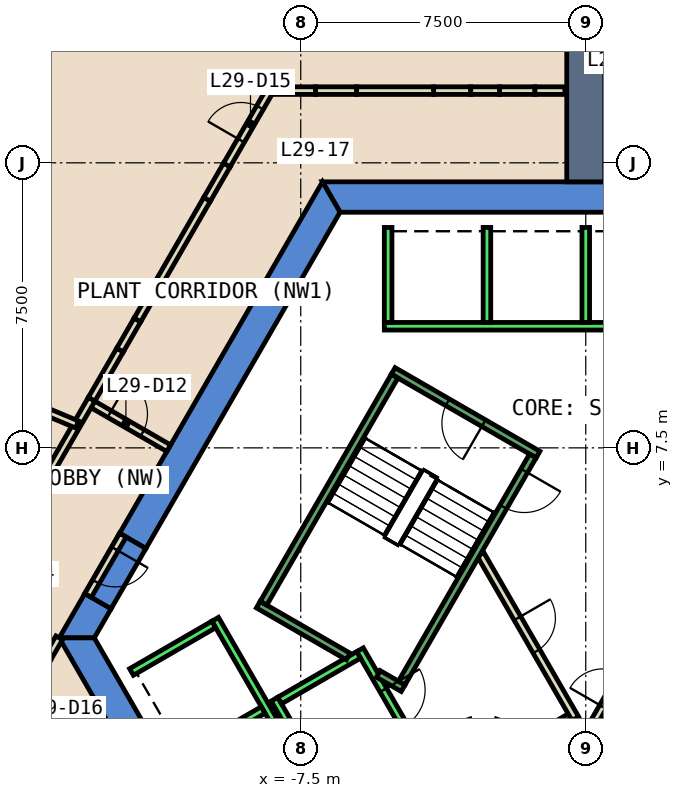
"""IFC4 building model, lengths in metres.
Left out: names, types, materials, properties, quantities, classifications, styles, units other than length and angle.
Written with IfcOpenShell. Run it as: python <this file> out.ifc"""

import sys

from ifc_helpers import new_model, si_unit, direction, frame, frame_2d, origin, place, context, subcontext, project, spatial, polyline, rectangle, outline, extrude, element, fill, save


model = new_model("IFC4")
c1 = context("Model", 3, precision=1e-05, world=origin(), true_north=direction((0.0, 1.0)))
c2 = subcontext(c1, "Body", "Model", "MODEL_VIEW")
j1 = project(units=[si_unit("LENGTHUNIT", "METRE"), si_unit("PLANEANGLEUNIT", "RADIAN")], contexts=[c1])
p1 = place(None, origin())
s1 = spatial("IfcSite", under=j1, at=p1, CompositionType="ELEMENT")
p2 = place(p1, origin())
s2 = spatial("IfcBuilding", under=s1, at=p2, CompositionType="ELEMENT")
p3 = place(p2, frame((0.0, 0.0, 132.8)))
s3 = spatial("IfcBuildingStorey", under=s2, at=p3, CompositionType="ELEMENT", Elevation=132.8)
p4 = place(p3, frame((0.0, 0.0, -0.6)))
e1 = element("IfcWall", 1, at=p4, inside=s3, PredefinedType="SHEAR", context=c2, shape_type="SweptSolid", body=[
    extrude(outline(polyline([(6.928, 14.5), (-6.928, 14.5), (-6.466, 13.7), (6.466, 13.7), (6.928, 14.5)])), origin(), (0.0, 0.0, 1.0), 5.4),
])
p5 = place(p3, frame((0.0, 0.0, -0.6)))
e2 = element("IfcWall", 2, at=p5, inside=s3, PredefinedType="SHEAR", context=c2, shape_type="SweptSolid", body=[
    extrude(outline(polyline([(-12.267, 5.252), (-11.575, 4.852), (-6.466, 13.7), (-6.928, 14.5), (-12.267, 5.252)])), origin(), (0.0, 0.0, 1.0), 5.4),
])
p6 = place(p3, frame((0.0, 0.0, -0.6)))
e3 = element("IfcWall", 3, at=p6, inside=s3, PredefinedType="SHEAR", context=c2, shape_type="SweptSolid", body=[
    extrude(outline(polyline([(-12.49, 3.268), (-13.182, 3.667), (-13.856, 2.5), (-12.933, 2.5), (-12.49, 3.268)])), origin(), (0.0, 0.0, 1.0), 5.4),
])
p7 = place(p3, frame((0.0, 0.0, 3.6)))
e4 = element("IfcWall", 4, at=p7, inside=s3, PredefinedType="SHEAR", context=c2, shape_type="SweptSolid", body=[
    extrude(outline(polyline([(-13.182, 3.667), (-12.49, 3.268), (-11.575, 4.852), (-12.267, 5.252), (-13.182, 3.667)])), origin(), (0.0, 0.0, 1.0), 1.2),
])
p8 = place(p3, frame((0.0, 0.0, -0.6)))
e5 = element("IfcWall", 5, at=p8, inside=s3, PredefinedType="SHEAR", context=c2, shape_type="SweptSolid", body=[
    extrude(outline(polyline([(-13.856, 2.5), (-6.928, -9.5), (-6.466, -8.7), (-12.933, 2.5), (-13.856, 2.5)])), origin(), (0.0, 0.0, 1.0), 5.4),
])
p9 = place(p3, frame((0.0, 14.5, 0.0), z_axis=(0.0, 0.0, 1.0), x_axis=(0.0, 1.0, 0.0)))
e6 = element("IfcWall", 6, at=p9, inside=s3, PredefinedType="SHEAR", context=c2, shape_type="SweptSolid", body=[
    extrude(rectangle(XDim=27.714, YDim=1.0, at=frame_2d((13.857, 0.0))), origin(), (0.0, 0.0, 1.0), 4.8),
])
p10 = place(p3, frame((-0.52, -1.0, 0.0), z_axis=(0.0, 0.0, 1.0), x_axis=(0.50011622646, 0.865958290007, 0.0)))
e7 = element("IfcWall", 7, at=p10, inside=s3, PredefinedType="PARTITIONING", context=c2, shape_type="SweptSolid", body=[
    extrude(rectangle(XDim=4.991, YDim=0.2, at=frame_2d((2.496, 0.0))), origin(), (0.0, 0.0, 1.0), 4.8),
])
p11 = place(p10, frame((1.945, 0.0, 0.0)))
e8 = element("IfcOpeningElement", 8, at=p11, cuts=e7, PredefinedType="OPENING", context=c2, shape_type="SweptSolid", body=[
    extrude(rectangle(XDim=1.0, YDim=2.1, at=frame_2d((0.5, 1.05))), frame((0.0, 0.11, 0.0), z_axis=(0.0, -1.0, 0.0), x_axis=(1.0, 0.0, 0.0)), (0.0, 0.0, 1.0), 0.22),
])
p12 = place(p3, frame((-0.412, 0.414, 0.0), z_axis=(0.0, 0.0, 1.0), x_axis=(-0.866017369001, -0.500013916395, 0.0)))
e9 = element("IfcWall", 9, at=p12, inside=s3, PredefinedType="PARTITIONING", context=c2, shape_type="SweptSolid", body=[
    extrude(rectangle(XDim=1.45, YDim=0.2, at=frame_2d((0.725, 0.0))), origin(), (0.0, 0.0, 1.0), 4.8),
])
p13 = place(p3, frame((-2.07, 0.16, 0.0), z_axis=(0.0, 0.0, 1.0), x_axis=(-0.942199461132, 0.335052496547, 0.0)))
e10 = element("IfcWall", 10, at=p13, inside=s3, PredefinedType="PARTITIONING", context=c2, shape_type="SweptSolid", body=[
    extrude(rectangle(XDim=0.337, YDim=0.2, at=frame_2d((0.169, 0.0))), origin(), (0.0, 0.0, 1.0), 4.8),
])
p14 = place(p3, frame((-3.012, 0.273, 0.0), z_axis=(0.0, 0.0, 1.0), x_axis=(-0.942280615813, -0.334824194261, 0.0)))
e11 = element("IfcWall", 11, at=p14, inside=s3, PredefinedType="PARTITIONING", context=c2, shape_type="SweptSolid", body=[
    extrude(rectangle(XDim=0.338, YDim=0.2, at=frame_2d((0.169, 0.0))), origin(), (0.0, 0.0, 1.0), 4.8),
])
p15 = place(p3, frame((-2.771, 4.7, 0.0), z_axis=(0.0, 0.0, 1.0), x_axis=(0.499969479948, -0.866043023828, 0.0)))
e12 = element("IfcWall", 12, at=p15, inside=s3, PredefinedType="PARTITIONING", context=c2, shape_type="SweptSolid", body=[
    extrude(rectangle(XDim=4.99, YDim=0.2, at=frame_2d((2.495, 0.0))), origin(), (0.0, 0.0, 1.0), 4.8),
])
p16 = place(p15, frame((1.945, 0.0, 0.0)))
e13 = element("IfcOpeningElement", 13, at=p16, cuts=e12, PredefinedType="OPENING", context=c2, shape_type="SweptSolid", body=[
    extrude(rectangle(XDim=1.0, YDim=2.1, at=frame_2d((0.5, 1.05))), frame((0.0, 0.11, 0.0), z_axis=(0.0, -1.0, 0.0), x_axis=(1.0, 0.0, 0.0)), (0.0, 0.0, 1.0), 0.22),
])
p17 = place(p3, frame((-13.053, 8.691, 0.0), z_axis=(0.0, 0.0, 1.0), x_axis=(0.865973769406, -0.500089422704, 0.0)))
e14 = element("IfcWall", 14, at=p17, inside=s3, PredefinedType="PARTITIONING", context=c2, shape_type="SweptSolid", body=[
    extrude(rectangle(XDim=2.399, YDim=0.2, at=frame_2d((1.2, 0.0))), origin(), (0.0, 0.0, 1.0), 4.8),
])
p18 = place(p17, frame((0.6, 0.0, 0.0)))
e15 = element("IfcOpeningElement", 15, at=p18, cuts=e14, PredefinedType="OPENING", context=c2, shape_type="SweptSolid", body=[
    extrude(rectangle(XDim=1.0, YDim=2.1, at=frame_2d((0.5, 1.05))), frame((0.0, 0.11, 0.0), z_axis=(0.0, -1.0, 0.0), x_axis=(1.0, 0.0, 0.0)), (0.0, 0.0, 1.0), 0.22),
])
p19 = place(p3, frame((-13.856, 2.501, 0.0), z_axis=(0.0, 0.0, 1.0), x_axis=(-0.500766044352, -0.865582675903, 0.0)))
e16 = element("IfcWall", 16, at=p19, inside=s3, PredefinedType="PARTITIONING", context=c2, shape_type="SweptSolid", body=[
    extrude(rectangle(XDim=0.641, YDim=0.2, at=frame_2d((0.321, 0.0))), origin(), (0.0, 0.0, 1.0), 2.4),
])
p20 = place(p3, frame((-13.003, 8.778, 0.0), z_axis=(0.0, 0.0, 1.0), x_axis=(0.499929606556, 0.866066041644, 0.0)))
e17 = element("IfcWall", 17, at=p20, inside=s3, PredefinedType="PARTITIONING", context=c2, shape_type="SweptSolid", body=[
    extrude(rectangle(XDim=1.496, YDim=0.2, at=frame_2d((0.748, 0.0))), origin(), (0.0, 0.0, 1.0), 4.8),
])
p21 = place(p3, frame((-8.214, 16.9, 0.0), z_axis=(0.0, 0.0, 1.0), x_axis=(1.0, 0.0, 0.0)))
e18 = element("IfcWall", 18, at=p21, inside=s3, PredefinedType="PARTITIONING", context=c2, shape_type="SweptSolid", body=[
    extrude(rectangle(XDim=1.105, YDim=0.2, at=frame_2d((0.553, 0.0))), origin(), (0.0, 0.0, 1.0), 4.8),
])
p22 = place(p3, frame((-14.001, -2.05, 0.0), z_axis=(0.0, 0.0, 1.0), x_axis=(-0.499842197933, 0.866116491683, 0.0)))
e19 = element("IfcWall", 19, at=p22, inside=s3, PredefinedType="PARTITIONING", context=c2, shape_type="SweptSolid", body=[
    extrude(rectangle(XDim=5.354, YDim=0.2, at=frame_2d((2.677, 0.0))), origin(), (0.0, 0.0, 1.0), 4.8),
])
p23 = place(p22, frame((1.301, 0.0, 0.0)))
e20 = element("IfcOpeningElement", 20, at=p23, cuts=e19, PredefinedType="OPENING", context=c2, shape_type="SweptSolid", body=[
    extrude(rectangle(XDim=1.0, YDim=2.1, at=frame_2d((0.5, 1.05))), frame((0.0, 0.11, 0.0), z_axis=(0.0, -1.0, 0.0), x_axis=(1.0, 0.0, 0.0)), (0.0, 0.0, 1.0), 0.22),
])
p24 = place(p3, frame((-12.181, 5.202, 0.0), z_axis=(0.0, 0.0, 1.0), x_axis=(-0.500215337403, -0.865901042976, 0.0)))
e21 = element("IfcWall", 21, at=p24, inside=s3, PredefinedType="PARTITIONING", context=c2, shape_type="SweptSolid", body=[
    extrude(rectangle(XDim=1.829, YDim=0.2, at=frame_2d((0.915, 0.0))), origin(), (0.0, 0.0, 1.0), 2.4),
])
p25 = place(p24, frame((0.415, 0.0, 0.0)))
e22 = element("IfcOpeningElement", 22, at=p25, cuts=e21, PredefinedType="OPENING", context=c2, shape_type="SweptSolid", body=[
    extrude(rectangle(XDim=1.0, YDim=2.1, at=frame_2d((0.5, 1.05))), frame((0.0, 0.11, 0.0), z_axis=(0.0, -1.0, 0.0), x_axis=(1.0, 0.0, 0.0)), (0.0, 0.0, 1.0), 0.22),
])
p26 = place(p3, frame((-14.582, 6.043, 0.0), z_axis=(0.0, 0.0, 1.0), x_axis=(0.499693771811, 0.866202132538, 0.0)))
e23 = element("IfcWall", 23, at=p26, inside=s3, PredefinedType="PARTITIONING", context=c2, shape_type="SweptSolid", body=[
    extrude(rectangle(XDim=0.982, YDim=0.2, at=frame_2d((0.491, 0.0))), origin(), (0.0, 0.0, 1.0), 2.4),
])
p27 = place(p3, frame((-14.091, 6.894, 0.0), z_axis=(0.0, 0.0, 1.0), x_axis=(0.500133637508, 0.865948234384, 0.0)))
e24 = element("IfcWall", 24, at=p27, inside=s3, PredefinedType="PARTITIONING", context=c2, shape_type="SweptSolid", body=[
    extrude(rectangle(XDim=2.176, YDim=0.2, at=frame_2d((1.088, 0.0))), origin(), (0.0, 0.0, 1.0), 4.8),
])
p28 = place(p3, frame((-12.255, 10.074, 0.0), z_axis=(0.0, 0.0, 1.0), x_axis=(0.499614570368, 0.866247817357, 0.0)))
e25 = element("IfcWall", 25, at=p28, inside=s3, PredefinedType="PARTITIONING", context=c2, shape_type="SweptSolid", body=[
    extrude(rectangle(XDim=0.914, YDim=0.2, at=frame_2d((0.457, 0.0))), origin(), (0.0, 0.0, 1.0), 2.4),
])
p29 = place(p3, frame((-11.798, 10.866, 0.0), z_axis=(0.0, 0.0, 1.0), x_axis=(0.49997801172, 0.866038098351, 0.0)))
e26 = element("IfcWall", 26, at=p29, inside=s3, PredefinedType="PARTITIONING", context=c2, shape_type="SweptSolid", body=[
    extrude(rectangle(XDim=3.666, YDim=0.2, at=frame_2d((1.833, 0.0))), origin(), (0.0, 0.0, 1.0), 4.8),
])
p30 = place(p3, frame((-9.965, 14.041, 0.0), z_axis=(0.0, 0.0, 1.0), x_axis=(0.500121408466, 0.865955297226, 0.0)))
e27 = element("IfcWall", 27, at=p30, inside=s3, PredefinedType="PARTITIONING", context=c2, shape_type="SweptSolid", body=[
    extrude(rectangle(XDim=1.042, YDim=0.2, at=frame_2d((0.521, 0.0))), origin(), (0.0, 0.0, 1.0), 2.4),
])
p31 = place(p3, frame((-9.444, 14.943, 0.0), z_axis=(0.0, 0.0, 1.0), x_axis=(0.500032858622, 0.866006432019, 0.0)))
e28 = element("IfcWall", 28, at=p31, inside=s3, PredefinedType="PARTITIONING", context=c2, shape_type="SweptSolid", body=[
    extrude(rectangle(XDim=2.36, YDim=0.2, at=frame_2d((1.18, 0.0))), origin(), (0.0, 0.0, 1.0), 4.8),
])
p32 = place(p31, frame((0.744, 0.0, 0.0)))
e29 = element("IfcOpeningElement", 29, at=p32, cuts=e28, PredefinedType="OPENING", context=c2, shape_type="SweptSolid", body=[
    extrude(rectangle(XDim=1.0, YDim=2.1, at=frame_2d((0.5, 1.05))), frame((0.0, 0.11, 0.0), z_axis=(0.0, -1.0, 0.0), x_axis=(1.0, 0.0, 0.0)), (0.0, 0.0, 1.0), 0.22),
])
p33 = place(p3, frame((-7.109, 16.9, 0.0), z_axis=(0.0, 0.0, 1.0), x_axis=(1.0, 0.0, 0.0)))
e30 = element("IfcWall", 30, at=p33, inside=s3, PredefinedType="PARTITIONING", context=c2, shape_type="SweptSolid", body=[
    extrude(rectangle(XDim=1.08, YDim=0.2, at=frame_2d((0.54, 0.0))), origin(), (0.0, 0.0, 1.0), 2.4),
])
p34 = place(p3, frame((-6.029, 16.9, 0.0), z_axis=(0.0, 0.0, 1.0), x_axis=(1.0, 0.0, 0.0)))
e31 = element("IfcWall", 31, at=p34, inside=s3, PredefinedType="PARTITIONING", context=c2, shape_type="SweptSolid", body=[
    extrude(rectangle(XDim=2.028, YDim=0.2, at=frame_2d((1.014, 0.0))), origin(), (0.0, 0.0, 1.0), 4.8),
])
p35 = place(p3, frame((-4.001, 16.9, 0.0), z_axis=(0.0, 0.0, 1.0), x_axis=(1.0, 0.0, 0.0)))
e32 = element("IfcWall", 32, at=p35, inside=s3, PredefinedType="PARTITIONING", context=c2, shape_type="SweptSolid", body=[
    extrude(rectangle(XDim=0.975, YDim=0.2, at=frame_2d((0.488, 0.0))), origin(), (0.0, 0.0, 1.0), 2.4),
])
p36 = place(p3, frame((-3.026, 16.9, 0.0), z_axis=(0.0, 0.0, 1.0), x_axis=(1.0, 0.0, 0.0)))
e33 = element("IfcWall", 33, at=p36, inside=s3, PredefinedType="PARTITIONING", context=c2, shape_type="SweptSolid", body=[
    extrude(rectangle(XDim=0.757, YDim=0.2, at=frame_2d((0.378, 0.0))), origin(), (0.0, 0.0, 1.0), 4.8),
])
p37 = place(p3, frame((-2.269, 16.9, 0.0), z_axis=(0.0, 0.0, 1.0), x_axis=(1.0, 0.0, 0.0)))
e34 = element("IfcWall", 34, at=p37, inside=s3, PredefinedType="PARTITIONING", context=c2, shape_type="SweptSolid", body=[
    extrude(rectangle(XDim=0.932, YDim=0.2, at=frame_2d((0.466, 0.0))), origin(), (0.0, 0.0, 1.0), 2.4),
])
p38 = place(p3, frame((-1.337, 16.9, 0.0), z_axis=(0.0, 0.0, 1.0), x_axis=(1.0, 0.0, 0.0)))
e35 = element("IfcWall", 35, at=p38, inside=s3, PredefinedType="PARTITIONING", context=c2, shape_type="SweptSolid", body=[
    extrude(rectangle(XDim=0.787, YDim=0.2, at=frame_2d((0.394, 0.0))), origin(), (0.0, 0.0, 1.0), 4.8),
])
p39 = place(p3, frame((-23.688, 12.437, 0.0), z_axis=(0.0, 0.0, 1.0), x_axis=(0.922136044786, -0.386865758249, 0.0)))
e36 = element("IfcWall", 36, at=p39, inside=s3, PredefinedType="PARTITIONING", context=c2, shape_type="SweptSolid", body=[
    extrude(rectangle(XDim=11.172, YDim=0.2, at=frame_2d((5.586, 0.0))), origin(), (0.0, 0.0, 1.0), 4.8),
])
p40 = place(p3, frame((5.3, 10.7, 0.0), z_axis=(0.0, 0.0, 1.0), x_axis=(-1.0, 0.0, 0.0)))
e37 = element("IfcWall", 37, at=p40, inside=s3, PredefinedType="STANDARD", context=c2, shape_type="SweptSolid", body=[
    extrude(rectangle(XDim=10.6, YDim=0.2, at=frame_2d((5.3, 0.0))), origin(), (0.0, 0.0, 1.0), 4.8),
])
for number, where, z_axis, x_axis in (
    (38, (0.0, 10.8, 0.0), (0.0, 0.0, 1.0), (0.0, 1.0, 0.0)),
    (39, (-2.6, 10.8, 0.0), (0.0, 0.0, 1.0), (0.0, 1.0, 0.0)),
    (40, (-5.2, 10.8, 0.0), (0.0, 0.0, 1.0), (0.0, 1.0, 0.0)),
):
    element("IfcWall", number, at=place(p3, frame(where, z_axis=z_axis, x_axis=x_axis)), inside=s3, PredefinedType="STANDARD", context=c2, shape_type="SweptSolid", body=[
        extrude(rectangle(XDim=2.5, YDim=0.2, at=frame_2d((1.25, 0.0))), origin(), (0.0, 0.0, 1.0), 4.8),
    ])
p41 = place(p3, frame((-5.94, 2.188, 0.0), z_axis=(0.0, 0.0, 1.0), x_axis=(0.49994636267, -0.866056369097, 0.0)))
e41 = element("IfcWall", 41, at=p41, inside=s3, PredefinedType="STANDARD", context=c2, shape_type="SweptSolid", body=[
    extrude(rectangle(XDim=2.8, YDim=0.2, at=frame_2d((1.4, 0.0))), origin(), (0.0, 0.0, 1.0), 4.8),
])
p42 = place(p41, frame((1.225, 0.0, 0.0)))
e42 = element("IfcOpeningElement", 42, at=p42, cuts=e41, PredefinedType="OPENING", context=c2, shape_type="SweptSolid", body=[
    extrude(rectangle(XDim=1.1, YDim=2.1, at=frame_2d((0.55, 1.05))), frame((0.0, 0.11, 0.0), z_axis=(0.0, -1.0, 0.0), x_axis=(1.0, 0.0, 0.0)), (0.0, 0.0, 1.0), 0.22),
])
p43 = place(p3, frame((-8.192, 0.888, 0.0), z_axis=(0.0, 0.0, 1.0), x_axis=(0.49994636267, -0.866056369097, 0.0)))
e43 = element("IfcWall", 43, at=p43, inside=s3, PredefinedType="STANDARD", context=c2, shape_type="SweptSolid", body=[
    extrude(rectangle(XDim=2.8, YDim=0.2, at=frame_2d((1.4, 0.0))), origin(), (0.0, 0.0, 1.0), 4.8),
])
p44 = place(p3, frame((-5.977, 2.052, 0.0), z_axis=(0.0, 0.0, 1.0), x_axis=(-0.865973769406, -0.500089422704, 0.0)))
e44 = element("IfcWall", 44, at=p44, inside=s3, PredefinedType="STANDARD", context=c2, shape_type="SweptSolid", body=[
    extrude(rectangle(XDim=2.399, YDim=0.2, at=frame_2d((1.2, 0.0))), origin(), (0.0, 0.0, 1.0), 4.8),
])
p45 = place(p3, frame((-9.751, 2.99, 0.0), z_axis=(0.0, 0.0, 1.0), x_axis=(0.50000090737, -0.866024879913, 0.0)))
e45 = element("IfcWall", 45, at=p45, inside=s3, PredefinedType="STANDARD", context=c2, shape_type="SweptSolid", body=[
    extrude(rectangle(XDim=10.6, YDim=0.2, at=frame_2d((5.3, 0.0))), origin(), (0.0, 0.0, 1.0), 4.8),
])
p46 = place(p3, frame((-9.788, 2.853, 0.0), z_axis=(0.0, 0.0, 1.0), x_axis=(-0.865998541277, -0.500046524342, 0.0)))
e46 = element("IfcWall", 46, at=p46, inside=s3, PredefinedType="STANDARD", context=c2, shape_type="SweptSolid", body=[
    extrude(rectangle(XDim=2.5, YDim=0.2, at=frame_2d((1.25, 0.0))), origin(), (0.0, 0.0, 1.0), 4.8),
])
p47 = place(p3, frame((-8.488, 0.602, 0.0), z_axis=(0.0, 0.0, 1.0), x_axis=(-0.866022959057, -0.500004234368, 0.0)))
e47 = element("IfcWall", 47, at=p47, inside=s3, PredefinedType="STANDARD", context=c2, shape_type="SweptSolid", body=[
    extrude(rectangle(XDim=2.5, YDim=0.2, at=frame_2d((1.25, 0.0))), origin(), (0.0, 0.0, 1.0), 4.8),
])
p48 = place(p3, frame((-1.256, 7.324, 0.0), z_axis=(0.0, 0.0, 1.0), x_axis=(-0.866046073146, 0.499964197906, 0.0)))
e48 = element("IfcWall", 48, at=p48, inside=s3, PredefinedType="STANDARD", context=c2, shape_type="SweptSolid", body=[
    extrude(rectangle(XDim=4.4, YDim=0.2, at=frame_2d((2.2, 0.0))), origin(), (0.0, 0.0, 1.0), 4.8),
])
p49 = place(p48, frame((1.65, 0.0, 0.0)))
e49 = element("IfcOpeningElement", 49, at=p49, cuts=e48, PredefinedType="OPENING", context=c2, shape_type="SweptSolid", body=[
    extrude(rectangle(XDim=1.1, YDim=2.2, at=frame_2d((0.55, 1.1))), frame((0.0, 0.11, 0.0), z_axis=(0.0, -1.0, 0.0), x_axis=(1.0, 0.0, 0.0)), (0.0, 0.0, 1.0), 0.22),
])
p50 = place(p3, frame((-6.25, 2.01, 0.0), z_axis=(0.0, 0.0, 1.0), x_axis=(-0.86611865017, 0.499838457731, 0.0)))
e50 = element("IfcWall", 50, at=p50, inside=s3, PredefinedType="STANDARD", context=c2, shape_type="SweptSolid", body=[
    extrude(rectangle(XDim=2.733, YDim=0.2, at=frame_2d((1.366, 0.0))), origin(), (0.0, 0.0, 1.0), 4.8),
])
p51 = place(p3, frame((-4.806, 1.176, 0.0), z_axis=(0.0, 0.0, 1.0), x_axis=(-0.866558586415, 0.499075361355, 0.0)))
e51 = element("IfcWall", 51, at=p51, inside=s3, PredefinedType="STANDARD", context=c2, shape_type="SweptSolid", body=[
    extrude(rectangle(XDim=0.751, YDim=0.2, at=frame_2d((0.376, 0.0))), origin(), (0.0, 0.0, 1.0), 4.8),
])
p52 = place(p3, frame((-1.393, 7.288, 0.0), z_axis=(0.0, 0.0, 1.0), x_axis=(-0.499963383562, -0.866046543262, 0.0)))
e52 = element("IfcWall", 52, at=p52, inside=s3, PredefinedType="STANDARD", context=c2, shape_type="SweptSolid", body=[
    extrude(rectangle(XDim=6.9, YDim=0.2, at=frame_2d((3.45, 0.0))), origin(), (0.0, 0.0, 1.0), 4.8),
])
p53 = place(p52, frame((0.45, 0.0, 0.0)))
e53 = element("IfcOpeningElement", 53, at=p53, cuts=e52, PredefinedType="OPENING", context=c2, shape_type="SweptSolid", body=[
    extrude(rectangle(XDim=1.1, YDim=2.2, at=frame_2d((0.55, 1.1))), frame((0.0, 0.11, 0.0), z_axis=(0.0, -1.0, 0.0), x_axis=(1.0, 0.0, 0.0)), (0.0, 0.0, 1.0), 0.22),
])
p54 = place(p3, frame((-5.03, 9.388, 0.0), z_axis=(0.0, 0.0, 1.0), x_axis=(-0.499978703459, -0.866037698999, 0.0)))
e54 = element("IfcWall", 54, at=p54, inside=s3, PredefinedType="STANDARD", context=c2, shape_type="SweptSolid", body=[
    extrude(rectangle(XDim=6.9, YDim=0.2, at=frame_2d((3.45, 0.0))), origin(), (0.0, 0.0, 1.0), 4.8),
])
p55 = place(p18, origin())
e55 = element("IfcDoor", 55, at=p55, inside=s3, OperationType="SINGLE_SWING_RIGHT", PredefinedType="DOOR", context=c2, shape_type="SweptSolid", body=[
    extrude(rectangle(XDim=1.0, YDim=2.1, at=frame_2d((0.5, 1.05))), frame((0.0, 0.025, 0.0), z_axis=(0.0, -1.0, 0.0), x_axis=(1.0, 0.0, 0.0)), (0.0, 0.0, 1.0), 0.05),
])
fill(e15, e55)
p56 = place(p32, origin())
e56 = element("IfcDoor", 56, at=p56, inside=s3, OperationType="SINGLE_SWING_LEFT", PredefinedType="DOOR", context=c2, shape_type="SweptSolid", body=[
    extrude(rectangle(XDim=1.0, YDim=2.1, at=frame_2d((0.5, 1.05))), frame((0.0, 0.025, 0.0), z_axis=(0.0, -1.0, 0.0), x_axis=(1.0, 0.0, 0.0)), (0.0, 0.0, 1.0), 0.05),
])
fill(e29, e56)
p57 = place(p11, origin())
e57 = element("IfcDoor", 57, at=p57, inside=s3, OperationType="SINGLE_SWING_LEFT", PredefinedType="DOOR", context=c2, shape_type="SweptSolid", body=[
    extrude(rectangle(XDim=1.0, YDim=2.1, at=frame_2d((0.5, 1.05))), frame((0.0, 0.025, 0.0), z_axis=(0.0, -1.0, 0.0), x_axis=(1.0, 0.0, 0.0)), (0.0, 0.0, 1.0), 0.05),
])
fill(e8, e57)
p58 = place(p16, origin())
e58 = element("IfcDoor", 58, at=p58, inside=s3, OperationType="SINGLE_SWING_RIGHT", PredefinedType="DOOR", context=c2, shape_type="SweptSolid", body=[
    extrude(rectangle(XDim=1.0, YDim=2.1, at=frame_2d((0.5, 1.05))), frame((0.0, 0.025, 0.0), z_axis=(0.0, -1.0, 0.0), x_axis=(1.0, 0.0, 0.0)), (0.0, 0.0, 1.0), 0.05),
])
fill(e13, e58)
p59 = place(p25, origin())
e59 = element("IfcDoor", 59, at=p59, inside=s3, OperationType="SINGLE_SWING_LEFT", PredefinedType="DOOR", context=c2, shape_type="SweptSolid", body=[
    extrude(rectangle(XDim=1.0, YDim=2.1, at=frame_2d((0.5, 1.05))), frame((0.0, 0.025, 0.0), z_axis=(0.0, -1.0, 0.0), x_axis=(1.0, 0.0, 0.0)), (0.0, 0.0, 1.0), 0.05),
])
fill(e22, e59)
p60 = place(p42, origin())
e60 = element("IfcDoor", 60, at=p60, inside=s3, OperationType="SLIDING_TO_LEFT", PredefinedType="DOOR", context=c2, shape_type="SweptSolid", body=[
    extrude(rectangle(XDim=1.1, YDim=2.1, at=frame_2d((0.55, 1.05))), frame((0.0, 0.025, 0.0), z_axis=(0.0, -1.0, 0.0), x_axis=(1.0, 0.0, 0.0)), (0.0, 0.0, 1.0), 0.05),
])
fill(e42, e60)
p61 = place(p53, origin())
e61 = element("IfcDoor", 61, at=p61, inside=s3, OperationType="SINGLE_SWING_LEFT", PredefinedType="DOOR", context=c2, shape_type="SweptSolid", body=[
    extrude(rectangle(XDim=1.1, YDim=2.2, at=frame_2d((0.55, 1.1))), frame((0.0, 0.025, 0.0), z_axis=(0.0, -1.0, 0.0), x_axis=(1.0, 0.0, 0.0)), (0.0, 0.0, 1.0), 0.05),
])
fill(e53, e61)
p62 = place(p49, origin())
e62 = element("IfcDoor", 62, at=p62, inside=s3, OperationType="SINGLE_SWING_LEFT", PredefinedType="DOOR", context=c2, shape_type="SweptSolid", body=[
    extrude(rectangle(XDim=1.1, YDim=2.2, at=frame_2d((0.55, 1.1))), frame((0.0, 0.025, 0.0), z_axis=(0.0, -1.0, 0.0), x_axis=(1.0, 0.0, 0.0)), (0.0, 0.0, 1.0), 0.05),
])
fill(e49, e62)
save(model, sys.argv[1])
